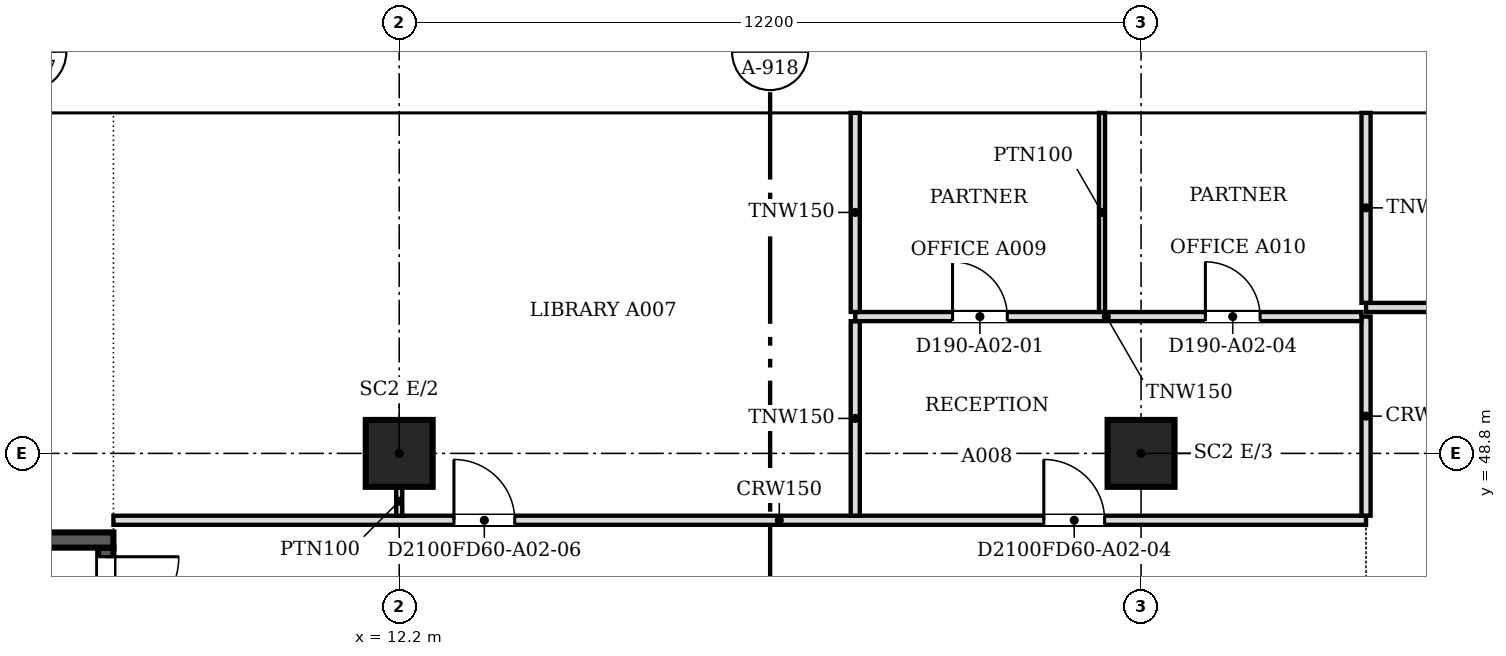
"""IFC4 building model, lengths in metres.
Left out: names, types, materials, properties, quantities, classifications, styles, units other than length and angle.
Written with IfcOpenShell. Run it as: python <this file> out.ifc"""

import sys

from ifc_helpers import new_model, si_unit, direction, frame, frame_2d, origin, origin_2d, place, context, subcontext, project, spatial, polyline, rectangle, outline, extrude, faceted_brep, source, transform, mapped, element, fill, save


model = new_model("IFC4")
c1 = context("Model", 3, precision=1e-05, world=origin(), true_north=direction((0.0, 1.0)))
c2 = subcontext(c1, "Body", "Model", "MODEL_VIEW")
j1 = project(units=[si_unit("LENGTHUNIT", "METRE"), si_unit("PLANEANGLEUNIT", "RADIAN")], contexts=[c1])
p1 = place(None, origin())
s1 = spatial("IfcSite", under=j1, at=p1, CompositionType="ELEMENT")
p2 = place(p1, origin())
s2 = spatial("IfcBuilding", under=s1, at=p2, CompositionType="ELEMENT")
p3 = place(p2, frame((0.0, 0.0, 25.8)))
s3 = spatial("IfcBuildingStorey", under=s2, at=p3, CompositionType="ELEMENT", Elevation=25.8)
for number, where, z_axis, x_axis in (
    (1, (12.2, 48.8, 0.0), (0.0, 0.0, 1.0), (1.0, 0.0, 0.0)),
    (2, (24.4, 48.8, 0.0), (0.0, 0.0, 1.0), (1.0, 0.0, 0.0)),
):
    element("IfcColumn", number, at=place(p3, frame(where, z_axis=z_axis, x_axis=x_axis)), inside=s3, PredefinedType="COLUMN", context=c2, shape_type="SweptSolid", body=[
        extrude(rectangle(XDim=1.1, YDim=1.1, at=origin_2d()), origin(), (0.0, 0.0, 1.0), 3.6),
    ])
m1 = source(origin(), c2, "Body", "SweptSolid", [
    extrude(outline(polyline([(6.1, 0.0), (3.05, 3.8), (0.0, 0.0), (6.1, 0.0)])), frame((0.0, 0.25, 0.0), z_axis=(0.0, -1.0, 0.0), x_axis=(1.0, 0.0, 0.0)), (0.0, 0.0, 1.0), 0.5),
])
p4 = place(p3, frame((33.55, 54.65, 0.0), z_axis=(0.0, 0.0, 1.0), x_axis=(-1.0, 0.0, 0.0)))
e3 = element("IfcWall", 3, at=p4, inside=s3, PredefinedType="SOLIDWALL", context=c2, shape_type="MappedRepresentation", body=[
    mapped(m1, transform((0.0, 0.0, 0.0), scale=1.0)),
])
m2 = source(origin(), c2, "Body", "SweptSolid", [
    extrude(outline(polyline([(5.579, 0.25), (3.05, 3.401), (0.521, 0.25), (5.579, 0.25)])), frame((0.0, 0.26, 0.0), z_axis=(0.0, -1.0, 0.0), x_axis=(1.0, 0.0, 0.0)), (0.0, 0.0, 1.0), 0.52),
])
p5 = place(p4, origin())
e4 = element("IfcOpeningElement", 4, at=p5, cuts=e3, PredefinedType="OPENING", context=c2, shape_type="MappedRepresentation", body=[
    mapped(m2, transform((0.0, 0.0, 0.0), scale=1.0)),
])
m3 = source(origin(), c2, "Body", "Brep", [
    faceted_brep([(6.1, -0.25, 0.0), (3.05, -0.25, 3.8), (0.0, -0.25, 0.0), (6.1, -0.25, 0.0), (0.0, 0.25, 0.0), (3.05, 0.25, 3.8), (6.1, 0.25, 0.0), (6.1, 0.25, 0.0)], [[[0, 1, 2, 3]], [[4, 5, 6, 7]], [[6, 5, 1, 0]], [[5, 4, 2, 1]], [[4, 7, 3, 2]], [[3, 7, 6, 0]]]),
])
p6 = place(p3, frame((27.45, 54.65, 0.0), z_axis=(0.0, 0.0, 1.0), x_axis=(-1.0, 0.0, 0.0)))
e5 = element("IfcWall", 5, at=p6, inside=s3, PredefinedType="SOLIDWALL", context=c2, shape_type="MappedRepresentation", body=[
    mapped(m3, transform((0.0, 0.0, 0.0), scale=1.0)),
])
p7 = place(p6, origin())
e6 = element("IfcOpeningElement", 6, at=p7, cuts=e5, PredefinedType="OPENING", context=c2, shape_type="MappedRepresentation", body=[
    mapped(m2, transform((0.0, 0.0, 0.0), scale=1.0)),
])
p8 = place(p3, frame((21.35, 54.65, 0.0), z_axis=(0.0, 0.0, 1.0), x_axis=(-1.0, 0.0, 0.0)))
e7 = element("IfcWall", 7, at=p8, inside=s3, PredefinedType="SOLIDWALL", context=c2, shape_type="MappedRepresentation", body=[
    mapped(m1, transform((0.0, 0.0, 0.0), scale=1.0)),
])
p9 = place(p8, origin())
e8 = element("IfcOpeningElement", 8, at=p9, cuts=e7, PredefinedType="OPENING", context=c2, shape_type="MappedRepresentation", body=[
    mapped(m2, transform((0.0, 0.0, 0.0), scale=1.0)),
])
p10 = place(p3, frame((15.25, 54.65, 0.0), z_axis=(0.0, 0.0, 1.0), x_axis=(-1.0, 0.0, 0.0)))
e9 = element("IfcWall", 9, at=p10, inside=s3, PredefinedType="SOLIDWALL", context=c2, shape_type="MappedRepresentation", body=[
    mapped(m1, transform((0.0, 0.0, 0.0), scale=1.0)),
])
p11 = place(p10, origin())
e10 = element("IfcOpeningElement", 10, at=p11, cuts=e9, PredefinedType="OPENING", context=c2, shape_type="MappedRepresentation", body=[
    mapped(m2, transform((0.0, 0.0, 0.0), scale=1.0)),
])
m4 = source(origin(), c2, "Body", "Brep", [
    faceted_brep([(3.05, -0.25, 3.74), (3.003, -0.25, 3.8), (0.0, -0.25, 0.0), (3.05, -0.25, 0.0), (0.0, 0.25, 0.0), (2.957, 0.25, 3.741), (2.957, 0.25, 0.0), (3.003, 0.0, 3.8)], [[[0, 1, 2, 3]], [[4, 5, 6]], [[7, 1, 0]], [[5, 4, 2, 1, 7]], [[4, 6, 3, 2]], [[3, 6, 5, 7, 0]]]),
])
p12 = place(p3, frame((9.15, 54.65, 0.0), z_axis=(0.0, 0.0, 1.0), x_axis=(-1.0, 0.0, 0.0)))
e11 = element("IfcWall", 11, at=p12, inside=s3, PredefinedType="SOLIDWALL", context=c2, shape_type="MappedRepresentation", body=[
    mapped(m4, transform((0.0, 0.0, 0.0), scale=1.0)),
])
m5 = source(origin(), c2, "Body", "SweptSolid", [
    extrude(outline(polyline([(2.803, 3.144), (0.516, 0.25), (2.803, 0.25), (2.803, 3.144)])), frame((0.0, 0.26, 0.0), z_axis=(0.0, -1.0, 0.0), x_axis=(1.0, 0.0, 0.0)), (0.0, 0.0, 1.0), 0.52),
])
p13 = place(p12, origin())
e12 = element("IfcOpeningElement", 12, at=p13, cuts=e11, PredefinedType="OPENING", context=c2, shape_type="MappedRepresentation", body=[
    mapped(m5, transform((0.0, 0.0, 0.0), scale=1.0)),
])
p14 = place(p2, frame((0.0, 0.0, 29.6)))
s4 = spatial("IfcBuildingStorey", under=s2, at=p14, CompositionType="ELEMENT", Elevation=29.6)
m6 = source(origin(), c2, "Body", "SweptSolid", [
    extrude(outline(polyline([(3.05, 0.0), (6.1, 3.8), (3.05, 7.6), (0.0, 3.8), (3.05, 0.0)])), frame((0.0, 0.25, 0.0), z_axis=(0.0, -1.0, 0.0), x_axis=(1.0, 0.0, 0.0)), (0.0, 0.0, 1.0), 0.5),
])
p15 = place(p14, frame((30.5, 54.65, -3.8), z_axis=(0.0, 0.0, 1.0), x_axis=(-1.0, 0.0, 0.0)))
e13 = element("IfcWall", 13, at=p15, inside=s4, PredefinedType="SOLIDWALL", context=c2, shape_type="MappedRepresentation", body=[
    mapped(m6, transform((0.0, 0.0, 0.0), scale=1.0)),
])
m7 = source(origin(), c2, "Body", "SweptSolid", [
    extrude(outline(polyline([(3.05, 0.399), (5.78, 3.8), (3.05, 7.2), (0.321, 3.8), (3.05, 0.399)])), frame((0.0, 0.26, 0.0), z_axis=(0.0, -1.0, 0.0), x_axis=(1.0, 0.0, 0.0)), (0.0, 0.0, 1.0), 0.52),
])
p16 = place(p15, origin())
e14 = element("IfcOpeningElement", 14, at=p16, cuts=e13, PredefinedType="OPENING", context=c2, shape_type="MappedRepresentation", body=[
    mapped(m7, transform((0.0, 0.0, 0.0), scale=1.0)),
])
m8 = source(origin(), c2, "Body", "Brep", [
    faceted_brep([(3.05, -0.25, 0.0), (6.1, -0.25, 3.8), (6.1, -0.25, 3.8), (3.05, -0.25, 7.6), (0.0, -0.25, 3.8), (0.0, 0.25, 3.8), (3.05, 0.25, 7.6), (6.1, 0.25, 3.8), (6.1, 0.25, 3.8), (3.05, 0.25, 0.0)], [[[0, 1, 2, 3, 4]], [[5, 6, 7, 8, 9]], [[9, 8, 1, 0]], [[7, 6, 3, 2]], [[6, 5, 4, 3]], [[5, 9, 0, 4]], [[1, 8, 7, 2]]]),
])
p17 = place(p14, frame((24.4, 54.65, -3.8), z_axis=(0.0, 0.0, 1.0), x_axis=(-1.0, 0.0, 0.0)))
e15 = element("IfcWall", 15, at=p17, inside=s4, PredefinedType="SOLIDWALL", context=c2, shape_type="MappedRepresentation", body=[
    mapped(m8, transform((0.0, 0.0, 0.0), scale=1.0)),
])
p18 = place(p17, origin())
e16 = element("IfcOpeningElement", 16, at=p18, cuts=e15, PredefinedType="OPENING", context=c2, shape_type="MappedRepresentation", body=[
    mapped(m7, transform((0.0, 0.0, 0.0), scale=1.0)),
])
p19 = place(p14, frame((18.3, 54.65, -3.8), z_axis=(0.0, 0.0, 1.0), x_axis=(-1.0, 0.0, 0.0)))
e17 = element("IfcWall", 17, at=p19, inside=s4, PredefinedType="SOLIDWALL", context=c2, shape_type="MappedRepresentation", body=[
    mapped(m6, transform((0.0, 0.0, 0.0), scale=1.0)),
])
p20 = place(p19, origin())
e18 = element("IfcOpeningElement", 18, at=p20, cuts=e17, PredefinedType="OPENING", context=c2, shape_type="MappedRepresentation", body=[
    mapped(m7, transform((0.0, 0.0, 0.0), scale=1.0)),
])
m9 = source(origin(), c2, "Body", "Brep", [
    faceted_brep([(3.05, -0.25, 0.0), (6.053, -0.25, 3.8), (3.05, -0.25, 7.6), (0.0, -0.25, 3.8), (0.0, 0.25, 3.8), (3.05, 0.25, 7.6), (6.007, 0.25, 3.859), (6.007, 0.25, 3.741), (3.05, 0.25, 0.0), (6.053, 0.0, 3.8)], [[[0, 1, 2, 3]], [[4, 5, 6, 7, 8]], [[8, 7, 9, 1, 0]], [[6, 5, 2, 1, 9]], [[5, 4, 3, 2]], [[4, 8, 0, 3]], [[7, 6, 9]]]),
])
p21 = place(p14, frame((12.2, 54.65, -3.8), z_axis=(0.0, 0.0, 1.0), x_axis=(-1.0, 0.0, 0.0)))
e19 = element("IfcWall", 19, at=p21, inside=s4, PredefinedType="SOLIDWALL", context=c2, shape_type="MappedRepresentation", body=[
    mapped(m9, transform((0.0, 0.0, 0.0), scale=1.0)),
])
m10 = source(origin(), c2, "Body", "SweptSolid", [
    extrude(outline(polyline([(3.049, 0.401), (5.735, 3.8), (3.049, 7.199), (0.321, 3.8), (3.049, 0.401)])), frame((0.0, 0.26, 0.0), z_axis=(0.0, -1.0, 0.0), x_axis=(1.0, 0.0, 0.0)), (0.0, 0.0, 1.0), 0.52),
])
p22 = place(p21, origin())
e20 = element("IfcOpeningElement", 20, at=p22, cuts=e19, PredefinedType="OPENING", context=c2, shape_type="MappedRepresentation", body=[
    mapped(m10, transform((0.0, 0.0, 0.0), scale=1.0)),
])
p23 = place(p3, frame((3.6, 47.375, 0.0), z_axis=(0.0, 0.0, 1.0), x_axis=(1.0, 0.0, 0.0)))
e21 = element("IfcWall", 21, at=p23, inside=s3, PredefinedType="SOLIDWALL", context=c2, shape_type="SweptSolid", body=[
    extrude(rectangle(XDim=3.9, YDim=0.25, at=frame_2d((1.95, 0.0))), origin(), (0.0, 0.0, 1.0), 3.8),
])
p24 = place(p3, frame((7.375, 47.25, 0.0), z_axis=(0.0, 0.0, 1.0), x_axis=(0.0, -1.0, 0.0)))
e22 = element("IfcWall", 22, at=p24, inside=s3, PredefinedType="SOLIDWALL", context=c2, shape_type="SweptSolid", body=[
    extrude(rectangle(XDim=8.0, YDim=0.25, at=frame_2d((4.0, 0.0))), origin(), (0.0, 0.0, 1.0), 3.8),
])
m11 = source(origin(), c2, "Body", "SweptSolid", [
    extrude(rectangle(XDim=1.2, YDim=2.1, at=frame_2d((0.6, 1.05))), frame((0.0, 0.135, 0.0), z_axis=(0.0, -1.0, 0.0), x_axis=(1.0, 0.0, 0.0)), (0.0, 0.0, 1.0), 0.27),
])
p25 = place(p24, frame((0.15, 0.0, 0.0)))
e23 = element("IfcOpeningElement", 23, at=p25, cuts=e22, PredefinedType="OPENING", context=c2, shape_type="MappedRepresentation", body=[
    mapped(m11, transform((0.0, 0.0, 0.0), scale=1.0)),
])
p26 = place(p3, frame((7.5, 47.7, 0.0), z_axis=(0.0, 0.0, 1.0), x_axis=(1.0, 0.0, 0.0)))
e24 = element("IfcWall", 24, at=p26, inside=s3, PredefinedType="PARTITIONING", context=c2, shape_type="SweptSolid", body=[
    extrude(rectangle(XDim=20.6, YDim=0.15, at=frame_2d((10.3, 0.0))), origin(), (0.0, 0.0, 1.0), 3.067),
])
m12 = source(origin(), c2, "Body", "SweptSolid", [
    extrude(rectangle(XDim=1.0, YDim=2.1, at=frame_2d((0.5, 1.05))), frame((0.0, 0.085, 0.0), z_axis=(0.0, -1.0, 0.0), x_axis=(1.0, 0.0, 0.0)), (0.0, 0.0, 1.0), 0.17),
])
p27 = place(p26, frame((15.301, 0.0, 0.0)))
e25 = element("IfcOpeningElement", 25, at=p27, cuts=e24, PredefinedType="OPENING", context=c2, shape_type="MappedRepresentation", body=[
    mapped(m12, transform((0.0, 0.0, 0.0), scale=1.0)),
])
p28 = place(p26, frame((5.6, 0.0, 0.0)))
e26 = element("IfcOpeningElement", 26, at=p28, cuts=e24, PredefinedType="OPENING", context=c2, shape_type="MappedRepresentation", body=[
    mapped(m12, transform((0.0, 0.0, 0.0), scale=1.0)),
])
p29 = place(p3, frame((19.7, 47.776, 0.0), z_axis=(0.0, 0.0, 1.0), x_axis=(0.0, 1.0, 0.0)))
e27 = element("IfcWall", 27, at=p29, inside=s3, PredefinedType="PARTITIONING", context=c2, shape_type="SweptSolid", body=[
    extrude(rectangle(XDim=3.198, YDim=0.15, at=frame_2d((1.599, 0.0))), origin(), (0.0, 0.0, 1.0), 3.067),
])
p30 = place(p3, frame((28.1, 47.776, 0.0), z_axis=(0.0, 0.0, 1.0), x_axis=(0.0, 1.0, 0.0)))
e28 = element("IfcWall", 28, at=p30, inside=s3, PredefinedType="PARTITIONING", context=c2, shape_type="SweptSolid", body=[
    extrude(rectangle(XDim=3.274, YDim=0.15, at=frame_2d((1.637, 0.0))), origin(), (0.0, 0.0, 1.0), 3.067),
])
p31 = place(p3, frame((12.2, 48.25, 0.0), z_axis=(0.0, 0.0, 1.0), x_axis=(0.0, -1.0, 0.0)))
e29 = element("IfcWall", 29, at=p31, inside=s3, PredefinedType="PARTITIONING", context=c2, shape_type="SweptSolid", body=[
    extrude(rectangle(XDim=0.475, YDim=0.1, at=frame_2d((0.238, 0.0))), origin(), (0.0, 0.0, 1.0), 3.067),
])
p32 = place(p3, frame((19.7, 51.05, 0.0), z_axis=(0.0, 0.0, 1.0), x_axis=(1.0, 0.0, 0.0)))
e30 = element("IfcWall", 30, at=p32, inside=s3, PredefinedType="PARTITIONING", context=c2, shape_type="SweptSolid", body=[
    extrude(rectangle(XDim=8.324, YDim=0.15, at=frame_2d((4.162, 0.0))), origin(), (0.0, 0.0, 1.0), 3.067),
])
m13 = source(origin(), c2, "Body", "SweptSolid", [
    extrude(rectangle(XDim=0.9, YDim=2.1, at=frame_2d((0.45, 1.05))), frame((0.0, 0.085, 0.0), z_axis=(0.0, -1.0, 0.0), x_axis=(1.0, 0.0, 0.0)), (0.0, 0.0, 1.0), 0.17),
])
p33 = place(p32, frame((1.6, 0.0, 0.0)))
e31 = element("IfcOpeningElement", 31, at=p33, cuts=e30, PredefinedType="OPENING", context=c2, shape_type="MappedRepresentation", body=[
    mapped(m13, transform((0.0, 0.0, 0.0), scale=1.0)),
])
p34 = place(p32, frame((5.758, 0.0, 0.0)))
e32 = element("IfcOpeningElement", 32, at=p34, cuts=e30, PredefinedType="OPENING", context=c2, shape_type="MappedRepresentation", body=[
    mapped(m13, transform((0.0, 0.0, 0.0), scale=1.0)),
])
p35 = place(p3, frame((19.7, 51.126, 0.0), z_axis=(0.0, 0.0, 1.0), x_axis=(0.0, 1.0, 0.0)))
e33 = element("IfcWall", 33, at=p35, inside=s3, PredefinedType="PARTITIONING", context=c2, shape_type="SweptSolid", body=[
    extrude(rectangle(XDim=3.274, YDim=0.15, at=frame_2d((1.637, 0.0))), origin(), (0.0, 0.0, 1.0), 3.067),
])
p36 = place(p3, frame((23.758, 51.126, 0.0), z_axis=(0.0, 0.0, 1.0), x_axis=(0.0, 1.0, 0.0)))
e34 = element("IfcWall", 34, at=p36, inside=s3, PredefinedType="PARTITIONING", context=c2, shape_type="SweptSolid", body=[
    extrude(rectangle(XDim=3.274, YDim=0.1, at=frame_2d((1.637, 0.0))), origin(), (0.0, 0.0, 1.0), 3.067),
])
p37 = place(p3, frame((28.1, 51.2, 0.0), z_axis=(0.0, 0.0, 1.0), x_axis=(1.0, 0.0, 0.0)))
e35 = element("IfcWall", 35, at=p37, inside=s3, PredefinedType="PARTITIONING", context=c2, shape_type="SweptSolid", body=[
    extrude(rectangle(XDim=31.438, YDim=0.15, at=frame_2d((15.719, 0.0))), origin(), (0.0, 0.0, 1.0), 3.067),
])
p38 = place(p37, frame((27.501, 0.0, 0.0)))
e36 = element("IfcOpeningElement", 36, at=p38, cuts=e35, PredefinedType="OPENING", context=c2, shape_type="MappedRepresentation", body=[
    mapped(m13, transform((0.0, 0.0, 0.0), scale=1.0)),
])
p39 = place(p37, frame((5.6, 0.0, 0.0)))
e37 = element("IfcOpeningElement", 37, at=p39, cuts=e35, PredefinedType="OPENING", context=c2, shape_type="MappedRepresentation", body=[
    mapped(m13, transform((0.0, 0.0, 0.0), scale=1.0)),
])
p40 = place(p37, frame((17.8, 0.0, 0.0)))
e38 = element("IfcOpeningElement", 38, at=p40, cuts=e35, PredefinedType="OPENING", context=c2, shape_type="MappedRepresentation", body=[
    mapped(m13, transform((0.0, 0.0, 0.0), scale=1.0)),
])
p41 = place(p3, frame((28.1, 51.276, 0.0), z_axis=(0.0, 0.0, 1.0), x_axis=(0.0, 1.0, 0.0)))
e39 = element("IfcWall", 39, at=p41, inside=s3, PredefinedType="PARTITIONING", context=c2, shape_type="SweptSolid", body=[
    extrude(rectangle(XDim=3.124, YDim=0.15, at=frame_2d((1.562, 0.0))), origin(), (0.0, 0.0, 1.0), 3.067),
])
m14 = source(origin(), c2, "Body", "SweptSolid", [
    extrude(rectangle(XDim=1.2, YDim=2.1, at=frame_2d((0.6, 1.05))), frame((0.0, 0.025, 0.0), z_axis=(0.0, -1.0, 0.0), x_axis=(1.0, 0.0, 0.0)), (0.0, 0.0, 1.0), 0.05),
])
p42 = place(p25, origin())
e40 = element("IfcDoor", 40, at=p42, inside=s3, OperationType="SINGLE_SWING_LEFT", PredefinedType="DOOR", context=c2, shape_type="MappedRepresentation", body=[
    mapped(m14, transform((0.0, 0.0, 0.0), scale=1.0)),
])
fill(e23, e40)
m15 = source(origin(), c2, "Body", "SweptSolid", [
    extrude(rectangle(XDim=0.9, YDim=2.1, at=frame_2d((0.45, 1.05))), frame((0.0, 0.025, 0.0), z_axis=(0.0, -1.0, 0.0), x_axis=(1.0, 0.0, 0.0)), (0.0, 0.0, 1.0), 0.05),
])
p43 = place(p33, origin())
e41 = element("IfcDoor", 41, at=p43, inside=s3, OperationType="SINGLE_SWING_LEFT", PredefinedType="DOOR", context=c2, shape_type="MappedRepresentation", body=[
    mapped(m15, transform((0.0, 0.0, 0.0), scale=1.0)),
])
fill(e31, e41)
p44 = place(p34, origin())
e42 = element("IfcDoor", 42, at=p44, inside=s3, OperationType="SINGLE_SWING_LEFT", PredefinedType="DOOR", context=c2, shape_type="MappedRepresentation", body=[
    mapped(m15, transform((0.0, 0.0, 0.0), scale=1.0)),
])
fill(e32, e42)
m16 = source(origin(), c2, "Body", "SweptSolid", [
    extrude(rectangle(XDim=1.0, YDim=2.1, at=frame_2d((0.5, 1.05))), frame((0.0, 0.025, 0.0), z_axis=(0.0, -1.0, 0.0), x_axis=(1.0, 0.0, 0.0)), (0.0, 0.0, 1.0), 0.05),
])
p45 = place(p27, origin())
e43 = element("IfcDoor", 43, at=p45, inside=s3, OperationType="SINGLE_SWING_LEFT", PredefinedType="DOOR", context=c2, shape_type="MappedRepresentation", body=[
    mapped(m16, transform((0.0, 0.0, 0.0), scale=1.0)),
])
fill(e25, e43)
p46 = place(p28, origin())
e44 = element("IfcDoor", 44, at=p46, inside=s3, OperationType="SINGLE_SWING_LEFT", PredefinedType="DOOR", context=c2, shape_type="MappedRepresentation", body=[
    mapped(m16, transform((0.0, 0.0, 0.0), scale=1.0)),
])
fill(e26, e44)
save(model, sys.argv[1])
